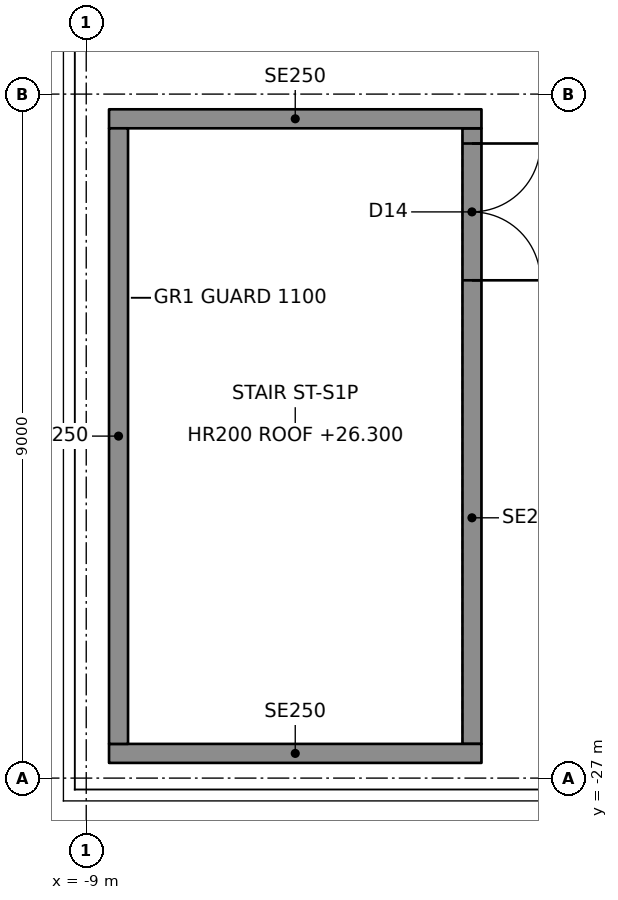
"""IFC4 building model, lengths in metres.
Left out: names, types, materials, properties, quantities, classifications, styles, units other than length and angle.
Written with IfcOpenShell. Run it as: python <this file> out.ifc"""

import sys

from ifc_helpers import new_model, si_unit, direction, frame, frame_2d, origin, place, context, subcontext, project, spatial, rectangle, extrude, element, fill, save


model = new_model("IFC4")
c1 = context("Model", 3, precision=1e-05, world=origin(), true_north=direction((0.0, 1.0)))
c2 = subcontext(c1, "Body", "Model", "MODEL_VIEW")
j1 = project(units=[si_unit("LENGTHUNIT", "METRE"), si_unit("PLANEANGLEUNIT", "RADIAN")], contexts=[c1])
p1 = place(None, origin())
s1 = spatial("IfcSite", under=j1, at=p1, CompositionType="ELEMENT")
p2 = place(p1, origin())
s2 = spatial("IfcBuilding", under=s1, at=p2, CompositionType="ELEMENT")
p3 = place(p2, frame((0.0, 0.0, 23.0)))
s3 = spatial("IfcBuildingStorey", under=s2, at=p3, CompositionType="ELEMENT", Elevation=23.0)
for number, where, z_axis, x_axis in (
    (1, (-8.7, -26.675, 0.0), (0.0, 0.0, 1.0), (1.0, 0.0, 0.0)),
    (2, (-8.7, -18.325, 0.0), (0.0, 0.0, 1.0), (1.0, 0.0, 0.0)),
):
    element("IfcWall", number, at=place(p3, frame(where, z_axis=z_axis, x_axis=x_axis)), inside=s3, PredefinedType="SOLIDWALL", context=c2, shape_type="SweptSolid", body=[
        extrude(rectangle(XDim=4.9, YDim=0.25, at=frame_2d((2.45, 0.0))), origin(), (0.0, 0.0, 1.0), 3.1),
    ])
p4 = place(p3, frame((-8.575, -26.55, 0.0), z_axis=(0.0, 0.0, 1.0), x_axis=(0.0, 1.0, 0.0)))
e3 = element("IfcWall", 3, at=p4, inside=s3, PredefinedType="SOLIDWALL", context=c2, shape_type="SweptSolid", body=[
    extrude(rectangle(XDim=8.1, YDim=0.25, at=frame_2d((4.05, 0.0))), origin(), (0.0, 0.0, 1.0), 3.1),
])
p5 = place(p3, frame((-3.925, -26.55, 0.0), z_axis=(0.0, 0.0, 1.0), x_axis=(0.0, 1.0, 0.0)))
e4 = element("IfcWall", 4, at=p5, inside=s3, PredefinedType="SOLIDWALL", context=c2, shape_type="SweptSolid", body=[
    extrude(rectangle(XDim=8.1, YDim=0.25, at=frame_2d((4.05, 0.0))), origin(), (0.0, 0.0, 1.0), 3.1),
])
p6 = place(p5, frame((6.1, 0.0, 0.0)))
e5 = element("IfcOpeningElement", 5, at=p6, cuts=e4, PredefinedType="OPENING", context=c2, shape_type="SweptSolid", body=[
    extrude(rectangle(XDim=1.8, YDim=2.1, at=frame_2d((0.9, 1.05))), frame((0.0, 0.135, 0.0), z_axis=(0.0, -1.0, 0.0), x_axis=(1.0, 0.0, 0.0)), (0.0, 0.0, 1.0), 0.27),
])
p7 = place(p6, frame((1.8, 0.0, 0.0), z_axis=(0.0, 0.0, 1.0), x_axis=(-1.0, 0.0, 0.0)))
e6 = element("IfcDoor", 6, at=p7, inside=s3, OperationType="DOUBLE_DOOR_SINGLE_SWING", PredefinedType="DOOR", context=c2, shape_type="SweptSolid", body=[
    extrude(rectangle(XDim=1.8, YDim=2.1, at=frame_2d((0.9, 1.05))), frame((0.0, 0.025, 0.0), z_axis=(0.0, -1.0, 0.0), x_axis=(1.0, 0.0, 0.0)), (0.0, 0.0, 1.0), 0.05),
])
fill(e5, e6)
save(model, sys.argv[1])
